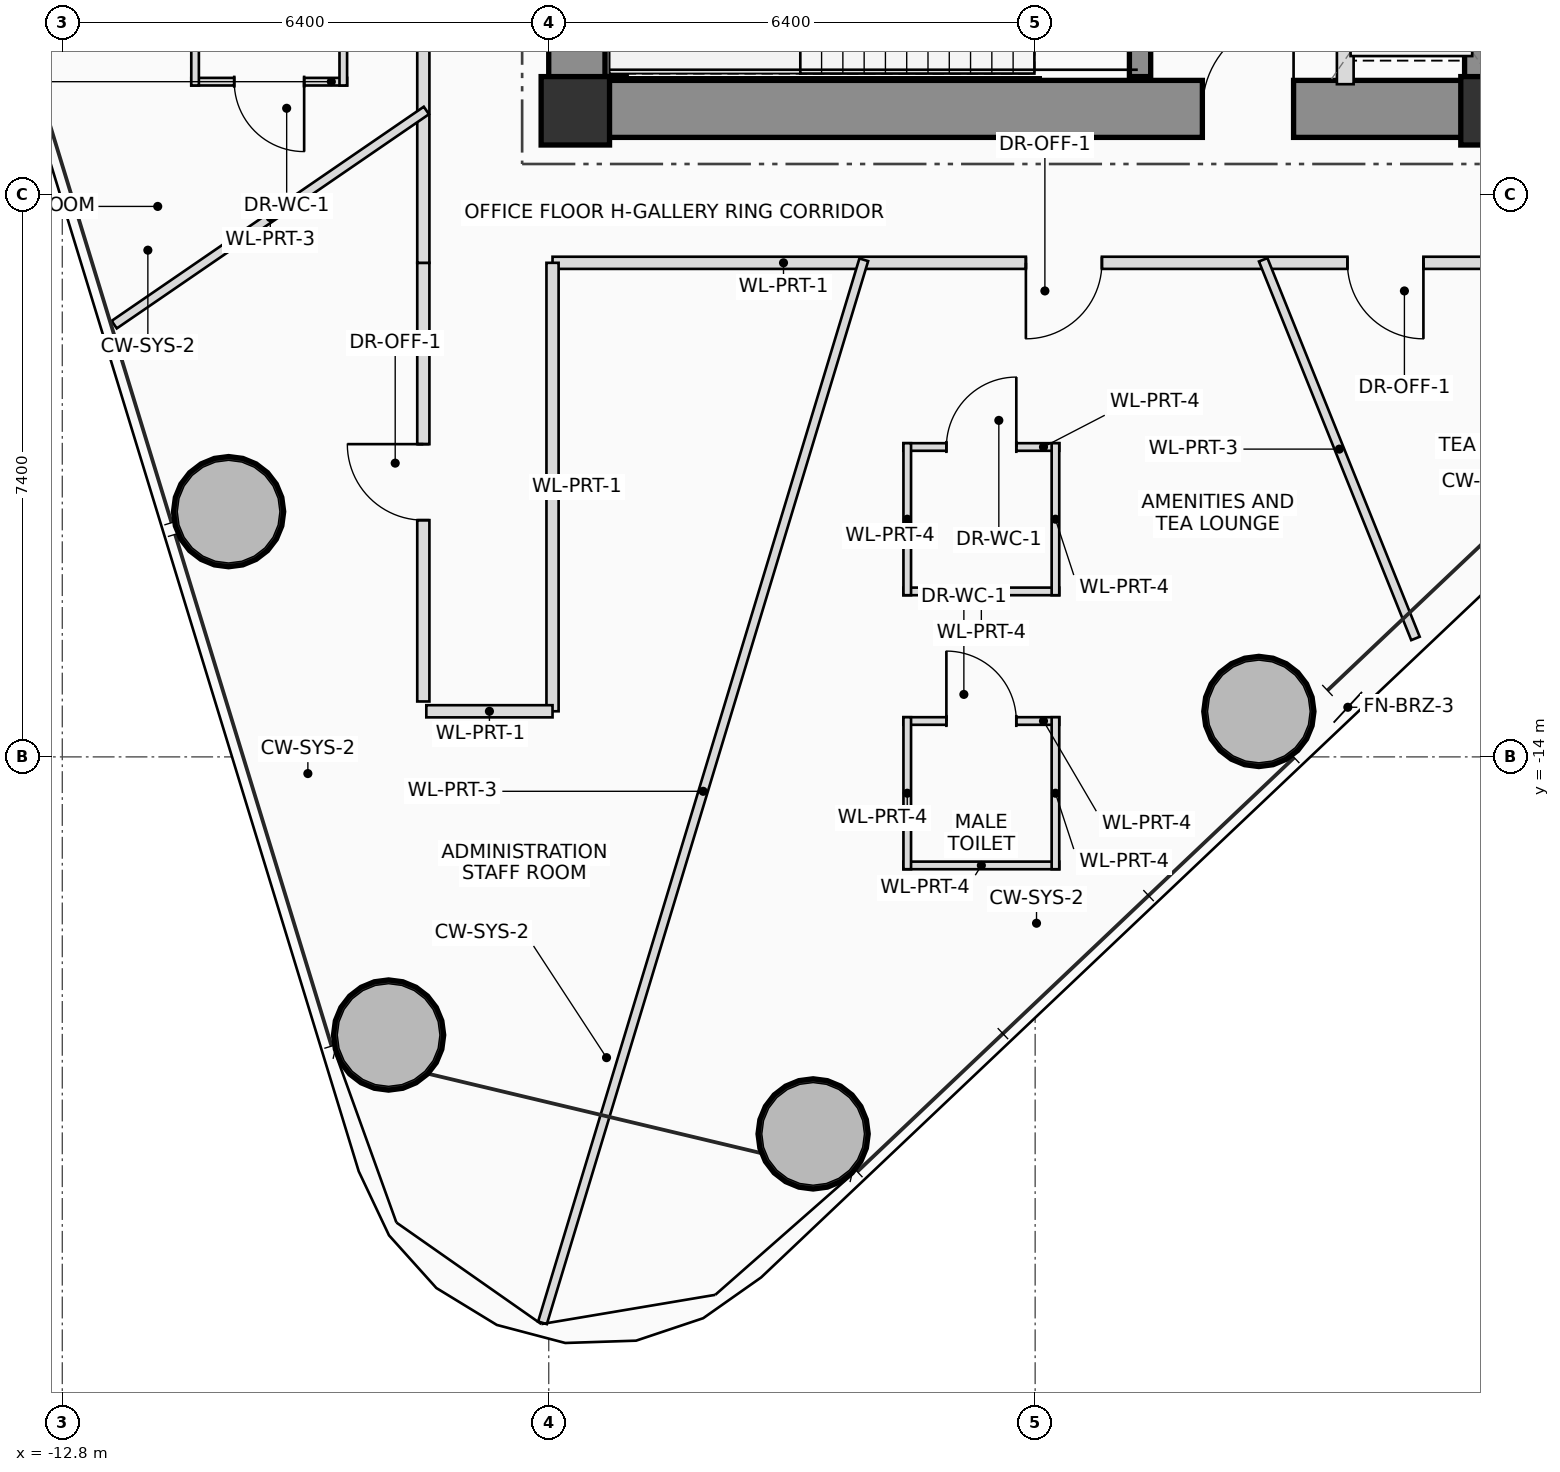
"""IFC4 building model, lengths in metres.
Left out: names, types, materials, properties, quantities, classifications, styles, units other than length and angle.
Written with IfcOpenShell. Run it as: python <this file> out.ifc"""

import sys

from ifc_helpers import new_model, si_unit, direction, frame, frame_2d, origin, origin_2d, place, context, subcontext, project, spatial, rectangle, hollow_circle, extrude, source, transform, mapped, element, fill, save


model = new_model("IFC4")
c1 = context("Model", 3, precision=1e-05, world=origin(), true_north=direction((0.0, 1.0)))
c2 = subcontext(c1, "Body", "Model", "MODEL_VIEW")
j1 = project(units=[si_unit("LENGTHUNIT", "METRE"), si_unit("PLANEANGLEUNIT", "RADIAN")], contexts=[c1])
p1 = place(None, origin())
s1 = spatial("IfcSite", under=j1, at=p1, CompositionType="ELEMENT")
p2 = place(p1, origin())
s2 = spatial("IfcBuilding", under=s1, at=p2, CompositionType="ELEMENT")
p3 = place(p2, frame((0.0, 0.0, 97.4)))
s3 = spatial("IfcBuildingStorey", under=s2, at=p3, CompositionType="ELEMENT", Elevation=97.4)
m1 = source(origin(), c2, "Body", "SweptSolid", [
    extrude(rectangle(XDim=0.9, YDim=0.9, at=origin_2d()), origin(), (0.0, 0.0, 1.0), 3.75),
])
for number, where, z_axis, x_axis in (
    (1, (-6.05, -5.5, 0.0), (0.0, 0.0, 1.0), (1.0, 0.0, 0.0)),
    (2, (6.05, -5.5, 0.0), (0.0, 0.0, 1.0), (1.0, 0.0, 0.0)),
):
    element("IfcColumn", number, at=place(p3, frame(where, z_axis=z_axis, x_axis=x_axis)), inside=s3, PredefinedType="COLUMN", context=c2, shape_type="MappedRepresentation", body=[
        mapped(m1, transform((0.0, 0.0, 0.0), scale=1.0)),
    ])
p4 = place(p3, frame((-6.4, -5.475, 0.0), z_axis=(0.0, 0.0, 1.0), x_axis=(1.0, 0.0, 0.0)))
e3 = element("IfcWall", 3, at=p4, inside=s3, PredefinedType="SHEAR", context=c2, shape_type="SweptSolid", body=[
    extrude(rectangle(XDim=12.8, YDim=0.75, at=frame_2d((6.4, 0.0))), origin(), (0.0, 0.0, 1.0), 3.75),
])
p5 = place(p4, frame((8.6, 0.0, 0.0)))
e4 = element("IfcOpeningElement", 4, at=p5, cuts=e3, PredefinedType="OPENING", context=c2, shape_type="SweptSolid", body=[
    extrude(rectangle(XDim=1.2, YDim=2.2, at=frame_2d((0.6, 1.1))), frame((0.0, 0.385, 0.0), z_axis=(0.0, -1.0, 0.0), x_axis=(1.0, 0.0, 0.0)), (0.0, 0.0, 1.0), 0.77),
])
p6 = place(p3, frame((6.025, -5.1, 0.0), z_axis=(0.0, 0.0, 1.0), x_axis=(0.0, 1.0, 0.0)))
e5 = element("IfcWall", 5, at=p6, inside=s3, PredefinedType="SHEAR", context=c2, shape_type="SweptSolid", body=[
    extrude(rectangle(XDim=10.2, YDim=0.75, at=frame_2d((5.1, 0.0))), origin(), (0.0, 0.0, 1.0), 3.75),
])
p7 = place(p3, frame((-6.025, -5.1, 0.0), z_axis=(0.0, 0.0, 1.0), x_axis=(0.0, 1.0, 0.0)))
e6 = element("IfcWall", 6, at=p7, inside=s3, PredefinedType="SHEAR", context=c2, shape_type="SweptSolid", body=[
    extrude(rectangle(XDim=3.35, YDim=0.75, at=frame_2d((1.675, 0.0))), origin(), (0.0, 0.0, 1.0), 3.75),
])
p8 = place(p3, frame((-5.52, -5.05, 0.0), z_axis=(0.0, 0.0, 1.0), x_axis=(0.0, 1.0, 0.0)))
e7 = element("IfcWall", 7, at=p8, inside=s3, PredefinedType="SHEAR", context=c2, shape_type="SweptSolid", body=[
    extrude(rectangle(XDim=2.75, YDim=0.28, at=frame_2d((1.375, 0.0))), origin(), (0.0, 0.0, 1.0), 3.75),
])
p9 = place(p3, frame((1.38, -5.05, 0.0), z_axis=(0.0, 0.0, 1.0), x_axis=(0.0, 1.0, 0.0)))
e8 = element("IfcWall", 8, at=p9, inside=s3, PredefinedType="SHEAR", context=c2, shape_type="SweptSolid", body=[
    extrude(rectangle(XDim=0.8, YDim=0.28, at=frame_2d((0.4, 0.0))), origin(), (0.0, 0.0, 1.0), 3.75),
])
m2 = source(origin(), c2, "Body", "SweptSolid", [
    extrude(hollow_circle(Radius=0.725, WallThickness=0.05, at=origin_2d()), origin(), (0.0, 0.0, 1.0), 3.75),
])
for number, where, z_axis, x_axis in (
    (9, (-2.921, -18.96, 0.0), (0.0, 0.0, 1.0), (1.0, 0.0, 0.0)),
    (10, (2.943, -13.402, 0.0), (0.0, 0.0, 1.0), (1.0, 0.0, 0.0)),
    (11, (-10.612, -10.774, 0.0), (0.0, 0.0, 1.0), (1.0, 0.0, 0.0)),
    (12, (-8.507, -17.659, 0.0), (0.0, 0.0, 1.0), (1.0, 0.0, 0.0)),
):
    element("IfcColumn", number, at=place(p3, frame(where, z_axis=z_axis, x_axis=x_axis)), inside=s3, PredefinedType="COLUMN", context=c2, shape_type="MappedRepresentation", body=[
        mapped(m2, transform((0.0, 0.0, 0.0), scale=1.0)),
    ])
p10 = place(p3, frame((4.08, -5.15, 0.0), z_axis=(0.0, 0.0, 1.0), x_axis=(0.0, 1.0, 0.0)))
e13 = element("IfcWall", 13, at=p10, inside=s3, PredefinedType="PLUMBINGWALL", context=c2, shape_type="SweptSolid", body=[
    extrude(rectangle(XDim=2.95, YDim=0.22, at=frame_2d((1.475, 0.0))), origin(), (0.0, 0.0, 1.0), 3.545),
])
p11 = place(p10, frame((0.95, 0.0, 0.0)))
e14 = element("IfcOpeningElement", 14, at=p11, cuts=e13, PredefinedType="OPENING", context=c2, shape_type="SweptSolid", body=[
    extrude(rectangle(XDim=1.2, YDim=2.25, at=frame_2d((0.6, 1.125))), frame((0.0, 0.12, 0.0), z_axis=(0.0, -1.0, 0.0), x_axis=(1.0, 0.0, 0.0)), (0.0, 0.0, 1.0), 0.24),
])
p12 = place(p3, frame((-1.733, -13.528, 0.0), z_axis=(0.0, 0.0, 1.0), x_axis=(1.0, 0.0, 0.0)))
e15 = element("IfcWall", 15, at=p12, inside=s3, PredefinedType="PARTITIONING", context=c2, shape_type="SweptSolid", body=[
    extrude(rectangle(XDim=2.05, YDim=0.1, at=frame_2d((1.025, 0.0))), origin(), (0.0, 0.0, 1.0), 3.2),
])
p13 = place(p12, frame((0.565, 0.0, 0.0)))
e16 = element("IfcOpeningElement", 16, at=p13, cuts=e15, PredefinedType="OPENING", context=c2, shape_type="SweptSolid", body=[
    extrude(rectangle(XDim=0.92, YDim=2.1, at=frame_2d((0.46, 1.05))), frame((0.0, 0.06, 0.0), z_axis=(0.0, -1.0, 0.0), x_axis=(1.0, 0.0, 0.0)), (0.0, 0.0, 1.0), 0.12),
])
p14 = place(p3, frame((0.317, -15.428, 0.0), z_axis=(0.0, 0.0, 1.0), x_axis=(-1.0, 0.0, 0.0)))
e17 = element("IfcWall", 17, at=p14, inside=s3, PredefinedType="PARTITIONING", context=c2, shape_type="SweptSolid", body=[
    extrude(rectangle(XDim=2.05, YDim=0.1, at=frame_2d((1.025, 0.0))), origin(), (0.0, 0.0, 1.0), 3.545),
])
p15 = place(p3, frame((0.267, -13.478, 0.0), z_axis=(0.0, 0.0, 1.0), x_axis=(0.0, -1.0, 0.0)))
e18 = element("IfcWall", 18, at=p15, inside=s3, PredefinedType="PARTITIONING", context=c2, shape_type="SweptSolid", body=[
    extrude(rectangle(XDim=2.0, YDim=0.1, at=frame_2d((1.0, 0.0))), origin(), (0.0, 0.0, 1.0), 3.545),
])
p16 = place(p3, frame((-1.683, -15.478, 0.0), z_axis=(0.0, 0.0, 1.0), x_axis=(0.0, 1.0, 0.0)))
e19 = element("IfcWall", 19, at=p16, inside=s3, PredefinedType="PARTITIONING", context=c2, shape_type="SweptSolid", body=[
    extrude(rectangle(XDim=2.0, YDim=0.1, at=frame_2d((1.0, 0.0))), origin(), (0.0, 0.0, 1.0), 3.2),
])
p17 = place(p3, frame((-1.733, -9.923, 0.0), z_axis=(0.0, 0.0, 1.0), x_axis=(1.0, 0.0, 0.0)))
e20 = element("IfcWall", 20, at=p17, inside=s3, PredefinedType="PARTITIONING", context=c2, shape_type="SweptSolid", body=[
    extrude(rectangle(XDim=2.05, YDim=0.1, at=frame_2d((1.025, 0.0))), origin(), (0.0, 0.0, 1.0), 3.545),
])
p18 = place(p17, frame((0.565, 0.0, 0.0)))
e21 = element("IfcOpeningElement", 21, at=p18, cuts=e20, PredefinedType="OPENING", context=c2, shape_type="SweptSolid", body=[
    extrude(rectangle(XDim=0.92, YDim=2.1, at=frame_2d((0.46, 1.05))), frame((0.0, 0.06, 0.0), z_axis=(0.0, -1.0, 0.0), x_axis=(1.0, 0.0, 0.0)), (0.0, 0.0, 1.0), 0.12),
])
p19 = place(p3, frame((0.317, -11.823, 0.0), z_axis=(0.0, 0.0, 1.0), x_axis=(-1.0, 0.0, 0.0)))
e22 = element("IfcWall", 22, at=p19, inside=s3, PredefinedType="PARTITIONING", context=c2, shape_type="SweptSolid", body=[
    extrude(rectangle(XDim=2.05, YDim=0.1, at=frame_2d((1.025, 0.0))), origin(), (0.0, 0.0, 1.0), 3.05),
])
for number, where, z_axis, x_axis in (
    (23, (0.267, -9.873, 0.0), (0.0, 0.0, 1.0), (0.0, -1.0, 0.0)),
    (24, (-1.683, -11.873, 0.0), (0.0, 0.0, 1.0), (0.0, 1.0, 0.0)),
):
    element("IfcWall", number, at=place(p3, frame(where, z_axis=z_axis, x_axis=x_axis)), inside=s3, PredefinedType="PARTITIONING", context=c2, shape_type="SweptSolid", body=[
        extrude(rectangle(XDim=2.0, YDim=0.1, at=frame_2d((1.0, 0.0))), origin(), (0.0, 0.0, 1.0), 3.05),
    ])
p20 = place(p3, frame((-9.053, -5.117, 0.0), z_axis=(0.0, 0.0, 1.0), x_axis=(-1.0, 0.0, 0.0)))
e25 = element("IfcWall", 25, at=p20, inside=s3, PredefinedType="PARTITIONING", context=c2, shape_type="SweptSolid", body=[
    extrude(rectangle(XDim=2.05, YDim=0.1, at=frame_2d((1.025, 0.0))), origin(), (0.0, 0.0, 1.0), 3.05),
])
p21 = place(p20, frame((0.565, 0.0, 0.0)))
e26 = element("IfcOpeningElement", 26, at=p21, cuts=e25, PredefinedType="OPENING", context=c2, shape_type="SweptSolid", body=[
    extrude(rectangle(XDim=0.92, YDim=2.1, at=frame_2d((0.46, 1.05))), frame((0.0, 0.06, 0.0), z_axis=(0.0, -1.0, 0.0), x_axis=(1.0, 0.0, 0.0)), (0.0, 0.0, 1.0), 0.12),
])
for number, where, z_axis, x_axis in (
    (27, (-9.103, -3.167, 0.0), (0.0, 0.0, 1.0), (0.0, -1.0, 0.0)),
    (28, (-11.053, -5.167, 0.0), (0.0, 0.0, 1.0), (0.0, 1.0, 0.0)),
):
    element("IfcWall", number, at=place(p3, frame(where, z_axis=z_axis, x_axis=x_axis)), inside=s3, PredefinedType="PARTITIONING", context=c2, shape_type="SweptSolid", body=[
        extrude(rectangle(XDim=2.0, YDim=0.1, at=frame_2d((1.0, 0.0))), origin(), (0.0, 0.0, 1.0), 2.85),
    ])
p22 = place(p3, frame((-8.05, -13.271, 0.0), z_axis=(0.0, 0.0, 1.0), x_axis=(0.0, 1.0, 0.0)))
e29 = element("IfcWall", 29, at=p22, inside=s3, PredefinedType="PARTITIONING", context=c2, shape_type="SweptSolid", body=[
    extrude(rectangle(XDim=5.771, YDim=0.16, at=frame_2d((2.885, 0.0))), origin(), (0.0, 0.0, 1.0), 2.85),
])
p23 = place(p22, frame((2.385, 0.0, 0.0)))
e30 = element("IfcOpeningElement", 30, at=p23, cuts=e29, PredefinedType="OPENING", context=c2, shape_type="SweptSolid", body=[
    extrude(rectangle(XDim=1.0, YDim=2.25, at=frame_2d((0.5, 1.125))), frame((0.0, 0.09, 0.0), z_axis=(0.0, -1.0, 0.0), x_axis=(1.0, 0.0, 0.0)), (0.0, 0.0, 1.0), 0.18),
])
p24 = place(p3, frame((-8.05, -7.5, 0.0), z_axis=(0.0, 0.0, 1.0), x_axis=(0.0, 1.0, 0.0)))
e31 = element("IfcWall", 31, at=p24, inside=s3, PredefinedType="PARTITIONING", context=c2, shape_type="SweptSolid", body=[
    extrude(rectangle(XDim=15.0, YDim=0.16, at=frame_2d((7.5, 0.0))), origin(), (0.0, 0.0, 1.0), 2.85),
])
p25 = place(p24, frame((3.292, 0.0, 0.0)))
e32 = element("IfcOpeningElement", 32, at=p25, cuts=e31, PredefinedType="OPENING", context=c2, shape_type="SweptSolid", body=[
    extrude(rectangle(XDim=1.0, YDim=2.25, at=frame_2d((0.5, 1.125))), frame((0.0, 0.09, 0.0), z_axis=(0.0, -1.0, 0.0), x_axis=(1.0, 0.0, 0.0)), (0.0, 0.0, 1.0), 0.18),
])
p26 = place(p24, frame((8.524, 0.0, 0.0)))
e33 = element("IfcOpeningElement", 33, at=p26, cuts=e31, PredefinedType="OPENING", context=c2, shape_type="SweptSolid", body=[
    extrude(rectangle(XDim=1.0, YDim=2.25, at=frame_2d((0.5, 1.125))), frame((0.0, 0.09, 0.0), z_axis=(0.0, -1.0, 0.0), x_axis=(1.0, 0.0, 0.0)), (0.0, 0.0, 1.0), 0.18),
])
p27 = place(p24, frame((13.105, 0.0, 0.0)))
e34 = element("IfcOpeningElement", 34, at=p27, cuts=e31, PredefinedType="OPENING", context=c2, shape_type="SweptSolid", body=[
    extrude(rectangle(XDim=1.0, YDim=2.25, at=frame_2d((0.5, 1.125))), frame((0.0, 0.09, 0.0), z_axis=(0.0, -1.0, 0.0), x_axis=(1.0, 0.0, 0.0)), (0.0, 0.0, 1.0), 0.18),
])
p28 = place(p3, frame((6.35, -7.5, 0.0), z_axis=(0.0, 0.0, 1.0), x_axis=(-1.0, 0.0, 0.0)))
e35 = element("IfcWall", 35, at=p28, inside=s3, PredefinedType="PARTITIONING", context=c2, shape_type="SweptSolid", body=[
    extrude(rectangle(XDim=12.7, YDim=0.16, at=frame_2d((6.35, 0.0))), origin(), (0.0, 0.0, 1.0), 2.85),
])
p29 = place(p28, frame((1.242, 0.0, 0.0)))
e36 = element("IfcOpeningElement", 36, at=p29, cuts=e35, PredefinedType="OPENING", context=c2, shape_type="SweptSolid", body=[
    extrude(rectangle(XDim=1.0, YDim=2.25, at=frame_2d((0.5, 1.125))), frame((0.0, 0.09, 0.0), z_axis=(0.0, -1.0, 0.0), x_axis=(1.0, 0.0, 0.0)), (0.0, 0.0, 1.0), 0.18),
])
p30 = place(p28, frame((5.472, 0.0, 0.0)))
e37 = element("IfcOpeningElement", 37, at=p30, cuts=e35, PredefinedType="OPENING", context=c2, shape_type="SweptSolid", body=[
    extrude(rectangle(XDim=1.0, YDim=2.25, at=frame_2d((0.5, 1.125))), frame((0.0, 0.09, 0.0), z_axis=(0.0, -1.0, 0.0), x_axis=(1.0, 0.0, 0.0)), (0.0, 0.0, 1.0), 0.18),
])
p31 = place(p3, frame((-6.35, -7.5, 0.0), z_axis=(0.0, 0.0, 1.0), x_axis=(0.0, -1.0, 0.0)))
e38 = element("IfcWall", 38, at=p31, inside=s3, PredefinedType="PARTITIONING", context=c2, shape_type="SweptSolid", body=[
    extrude(rectangle(XDim=5.9, YDim=0.16, at=frame_2d((2.95, 0.0))), origin(), (0.0, 0.0, 1.0), 2.85),
])
p32 = place(p3, frame((-6.35, -13.4, 0.0), z_axis=(0.0, 0.0, 1.0), x_axis=(-1.0, 0.0, 0.0)))
e39 = element("IfcWall", 39, at=p32, inside=s3, PredefinedType="PARTITIONING", context=c2, shape_type="SweptSolid", body=[
    extrude(rectangle(XDim=1.66, YDim=0.16, at=frame_2d((0.83, 0.0))), origin(), (0.0, 0.0, 1.0), 2.85),
])
p33 = place(p3, frame((-8.01, -5.496, 0.0), z_axis=(0.0, 0.0, 1.0), x_axis=(-0.824586433319, -0.565735993186, 0.0)))
e40 = element("IfcWall", 40, at=p33, inside=s3, PredefinedType="PARTITIONING", context=c2, shape_type="SweptSolid", body=[
    extrude(rectangle(XDim=4.981, YDim=0.12, at=frame_2d((2.49, 0.0))), origin(), (0.0, 0.0, 1.0), 3.01),
])
p34 = place(p3, frame((-2.255, -7.46, 0.0), z_axis=(0.0, 0.0, 1.0), x_axis=(-0.289332531311, -0.957228648926, 0.0)))
e41 = element("IfcWall", 41, at=p34, inside=s3, PredefinedType="PARTITIONING", context=c2, shape_type="SweptSolid", body=[
    extrude(rectangle(XDim=14.611, YDim=0.12, at=frame_2d((7.305, 0.0))), origin(), (0.0, 0.0, 1.0), 2.85),
])
p35 = place(p3, frame((3.0, -7.46, 0.0), z_axis=(0.0, 0.0, 1.0), x_axis=(0.37313810105, -0.927775812115, 0.0)))
e42 = element("IfcWall", 42, at=p35, inside=s3, PredefinedType="PARTITIONING", context=c2, shape_type="SweptSolid", body=[
    extrude(rectangle(XDim=5.37, YDim=0.12, at=frame_2d((2.685, 0.0))), origin(), (0.0, 0.0, 1.0), 2.85),
])
p36 = place(p5, origin())
e43 = element("IfcDoor", 43, at=p36, inside=s3, OperationType="SINGLE_SWING_RIGHT", PredefinedType="DOOR", context=c2, shape_type="SweptSolid", body=[
    extrude(rectangle(XDim=1.2, YDim=2.2, at=frame_2d((0.6, 1.1))), frame((0.0, 0.025, 0.0), z_axis=(0.0, -1.0, 0.0), x_axis=(1.0, 0.0, 0.0)), (0.0, 0.0, 1.0), 0.05),
])
fill(e4, e43)
p37 = place(p13, origin())
e44 = element("IfcDoor", 44, at=p37, inside=s3, OperationType="SINGLE_SWING_LEFT", PredefinedType="DOOR", context=c2, shape_type="SweptSolid", body=[
    extrude(rectangle(XDim=0.92, YDim=2.1, at=frame_2d((0.46, 1.05))), frame((0.0, 0.025, 0.0), z_axis=(0.0, -1.0, 0.0), x_axis=(1.0, 0.0, 0.0)), (0.0, 0.0, 1.0), 0.05),
])
fill(e16, e44)
p38 = place(p18, origin())
e45 = element("IfcDoor", 45, at=p38, inside=s3, OperationType="SINGLE_SWING_RIGHT", PredefinedType="DOOR", context=c2, shape_type="SweptSolid", body=[
    extrude(rectangle(XDim=0.92, YDim=2.1, at=frame_2d((0.46, 1.05))), frame((0.0, 0.025, 0.0), z_axis=(0.0, -1.0, 0.0), x_axis=(1.0, 0.0, 0.0)), (0.0, 0.0, 1.0), 0.05),
])
fill(e21, e45)
p39 = place(p21, origin())
e46 = element("IfcDoor", 46, at=p39, inside=s3, OperationType="SINGLE_SWING_LEFT", PredefinedType="DOOR", context=c2, shape_type="SweptSolid", body=[
    extrude(rectangle(XDim=0.92, YDim=2.1, at=frame_2d((0.46, 1.05))), frame((0.0, 0.025, 0.0), z_axis=(0.0, -1.0, 0.0), x_axis=(1.0, 0.0, 0.0)), (0.0, 0.0, 1.0), 0.05),
])
fill(e26, e46)
p40 = place(p23, origin())
e47 = element("IfcDoor", 47, at=p40, inside=s3, OperationType="SINGLE_SWING_RIGHT", PredefinedType="DOOR", context=c2, shape_type="SweptSolid", body=[
    extrude(rectangle(XDim=1.0, YDim=2.25, at=frame_2d((0.5, 1.125))), frame((0.0, 0.025, 0.0), z_axis=(0.0, -1.0, 0.0), x_axis=(1.0, 0.0, 0.0)), (0.0, 0.0, 1.0), 0.05),
])
fill(e30, e47)
p41 = place(p29, origin())
e48 = element("IfcDoor", 48, at=p41, inside=s3, OperationType="SINGLE_SWING_LEFT", PredefinedType="DOOR", context=c2, shape_type="SweptSolid", body=[
    extrude(rectangle(XDim=1.0, YDim=2.25, at=frame_2d((0.5, 1.125))), frame((0.0, 0.025, 0.0), z_axis=(0.0, -1.0, 0.0), x_axis=(1.0, 0.0, 0.0)), (0.0, 0.0, 1.0), 0.05),
])
fill(e36, e48)
p42 = place(p30, origin())
e49 = element("IfcDoor", 49, at=p42, inside=s3, OperationType="SINGLE_SWING_RIGHT", PredefinedType="DOOR", context=c2, shape_type="SweptSolid", body=[
    extrude(rectangle(XDim=1.0, YDim=2.25, at=frame_2d((0.5, 1.125))), frame((0.0, 0.025, 0.0), z_axis=(0.0, -1.0, 0.0), x_axis=(1.0, 0.0, 0.0)), (0.0, 0.0, 1.0), 0.05),
])
fill(e37, e49)
save(model, sys.argv[1])
